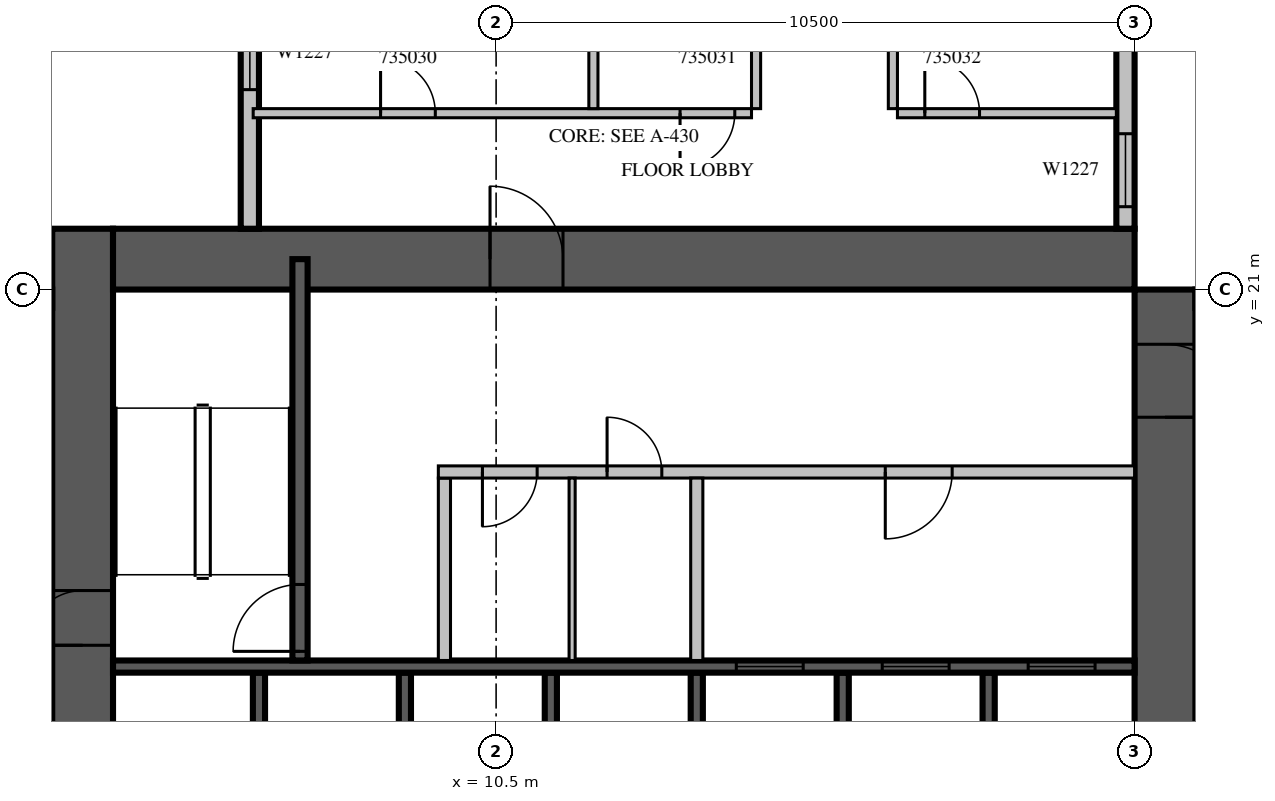
"""IFC4 building model, lengths in metres.
Left out: names, types, materials, properties, quantities, classifications, styles, units other than length and angle.
Written with IfcOpenShell. Run it as: python <this file> out.ifc"""

import sys

from ifc_helpers import new_model, si_unit, direction, frame, frame_2d, origin, place, context, subcontext, project, spatial, rectangle, extrude, source, transform, mapped, element, fill, save


model = new_model("IFC4")
c1 = context("Model", 3, precision=1e-05, world=origin(), true_north=direction((0.0, 1.0)))
c2 = subcontext(c1, "Body", "Model", "MODEL_VIEW")
j1 = project(units=[si_unit("LENGTHUNIT", "METRE"), si_unit("PLANEANGLEUNIT", "RADIAN")], contexts=[c1])
p1 = place(None, origin())
s1 = spatial("IfcSite", under=j1, at=p1, CompositionType="ELEMENT")
p2 = place(p1, origin())
s2 = spatial("IfcBuilding", under=s1, at=p2, CompositionType="ELEMENT")
p3 = place(p2, frame((0.0, 0.0, 158.1)))
s3 = spatial("IfcBuildingStorey", under=s2, at=p3, CompositionType="ELEMENT", Elevation=158.1)
m1 = source(origin(), c2, "Body", "SweptSolid", [
    extrude(rectangle(XDim=17.8, YDim=1.0, at=frame_2d((8.9, 0.0))), origin(), (0.0, 0.0, 1.0), 4.2),
])
p4 = place(p3, frame((3.7, 4.2, 0.0), z_axis=(0.0, 0.0, 1.0), x_axis=(0.0, 1.0, 0.0)))
e1 = element("IfcWall", 1, at=p4, inside=s3, PredefinedType="SHEAR", context=c2, shape_type="MappedRepresentation", body=[
    mapped(m1, transform((0.0, 0.0, 0.0), scale=1.0)),
])
m2 = source(origin(), c2, "Body", "SweptSolid", [
    extrude(rectangle(XDim=2.2, YDim=2.1, at=frame_2d((1.1, 1.05))), frame((0.0, 0.51, 0.0), z_axis=(0.0, -1.0, 0.0), x_axis=(1.0, 0.0, 0.0)), (0.0, 0.0, 1.0), 1.02),
])
p5 = place(p4, frame((4.2, 0.0, 0.0)))
e2 = element("IfcOpeningElement", 2, at=p5, cuts=e1, PredefinedType="OPENING", context=c2, shape_type="MappedRepresentation", body=[
    mapped(m2, transform((0.0, 0.0, 0.0), scale=1.0)),
])
m3 = source(origin(), c2, "Body", "SweptSolid", [
    extrude(rectangle(XDim=0.9, YDim=2.1, at=frame_2d((0.45, 1.05))), frame((0.0, 0.51, 0.0), z_axis=(0.0, -1.0, 0.0), x_axis=(1.0, 0.0, 0.0)), (0.0, 0.0, 1.0), 1.02),
])
p6 = place(p4, frame((10.95, 0.0, 0.0)))
e3 = element("IfcOpeningElement", 3, at=p6, cuts=e1, PredefinedType="OPENING", context=c2, shape_type="MappedRepresentation", body=[
    mapped(m3, transform((0.0, 0.0, 0.0), scale=1.0)),
])
m4 = source(origin(), c2, "Body", "SweptSolid", [
    extrude(rectangle(XDim=16.8, YDim=1.0, at=frame_2d((8.4, 0.0))), origin(), (0.0, 0.0, 1.0), 4.2),
])
p7 = place(p3, frame((21.5, 4.2, 0.0), z_axis=(0.0, 0.0, 1.0), x_axis=(0.0, 1.0, 0.0)))
e4 = element("IfcWall", 4, at=p7, inside=s3, PredefinedType="SHEAR", context=c2, shape_type="MappedRepresentation", body=[
    mapped(m4, transform((0.0, 0.0, 0.0), scale=1.0)),
])
p8 = place(p7, frame((4.2, 0.0, 0.0)))
e5 = element("IfcOpeningElement", 5, at=p8, cuts=e4, PredefinedType="OPENING", context=c2, shape_type="MappedRepresentation", body=[
    mapped(m2, transform((0.0, 0.0, 0.0), scale=1.0)),
])
m5 = source(origin(), c2, "Body", "SweptSolid", [
    extrude(rectangle(XDim=1.2, YDim=2.1, at=frame_2d((0.6, 1.05))), frame((0.0, 0.51, 0.0), z_axis=(0.0, -1.0, 0.0), x_axis=(1.0, 0.0, 0.0)), (0.0, 0.0, 1.0), 1.02),
])
p9 = place(p7, frame((14.7, 0.0, 0.0)))
e6 = element("IfcOpeningElement", 6, at=p9, cuts=e4, PredefinedType="OPENING", context=c2, shape_type="MappedRepresentation", body=[
    mapped(m5, transform((0.0, 0.0, 0.0), scale=1.0)),
])
p10 = place(p3, frame((4.2, 21.5, 0.0), z_axis=(0.0, 0.0, 1.0), x_axis=(1.0, 0.0, 0.0)))
e7 = element("IfcWall", 7, at=p10, inside=s3, PredefinedType="SHEAR", context=c2, shape_type="MappedRepresentation", body=[
    mapped(m4, transform((0.0, 0.0, 0.0), scale=1.0)),
])
p11 = place(p10, frame((6.2, 0.0, 0.0)))
e8 = element("IfcOpeningElement", 8, at=p11, cuts=e7, PredefinedType="OPENING", context=c2, shape_type="MappedRepresentation", body=[
    mapped(m5, transform((0.0, 0.0, 0.0), scale=1.0)),
])
m6 = source(origin(), c2, "Body", "SweptSolid", [
    extrude(rectangle(XDim=6.875, YDim=0.3, at=frame_2d((3.438, 0.0))), origin(), (0.0, 0.0, 1.0), 3.8),
])
p12 = place(p3, frame((20.85, 22.0, 0.0), z_axis=(0.0, 0.0, 1.0), x_axis=(0.0, 1.0, 0.0)))
e9 = element("IfcWall", 9, at=p12, inside=s3, PredefinedType="STANDARD", context=c2, shape_type="MappedRepresentation", body=[
    mapped(m6, transform((0.0, 0.0, 0.0), scale=1.0)),
])
m7 = source(origin(), c2, "Body", "SweptSolid", [
    extrude(rectangle(XDim=1.2, YDim=2.7, at=frame_2d((0.6, 1.35))), frame((0.0, 0.16, 0.0), z_axis=(0.0, -1.0, 0.0), x_axis=(1.0, 0.0, 0.0)), (0.0, 0.0, 1.0), 0.32),
])
p13 = place(p12, frame((0.362, 0.0, 0.6)))
e10 = element("IfcOpeningElement", 10, at=p13, cuts=e9, PredefinedType="OPENING", context=c2, shape_type="MappedRepresentation", body=[
    mapped(m7, transform((0.0, 0.0, 0.0), scale=1.0)),
])
m8 = source(origin(), c2, "Body", "SweptSolid", [
    extrude(rectangle(XDim=2.4, YDim=2.7, at=frame_2d((1.2, 1.35))), frame((0.0, 0.16, 0.0), z_axis=(0.0, -1.0, 0.0), x_axis=(1.0, 0.0, 0.0)), (0.0, 0.0, 1.0), 0.32),
])
p14 = place(p12, frame((4.1, 0.0, 0.6)))
e11 = element("IfcOpeningElement", 11, at=p14, cuts=e9, PredefinedType="OPENING", context=c2, shape_type="MappedRepresentation", body=[
    mapped(m8, transform((0.0, 0.0, 0.0), scale=1.0)),
])
m9 = source(origin(), c2, "Body", "SweptSolid", [
    extrude(rectangle(XDim=16.4, YDim=0.3, at=frame_2d((8.2, 0.0))), origin(), (0.0, 0.0, 1.0), 3.8),
])
p15 = place(p3, frame((6.45, 38.4, 0.0), z_axis=(0.0, 0.0, 1.0), x_axis=(0.0, -1.0, 0.0)))
e12 = element("IfcWall", 12, at=p15, inside=s3, PredefinedType="STANDARD", context=c2, shape_type="MappedRepresentation", body=[
    mapped(m9, transform((0.0, 0.0, 0.0), scale=1.0)),
])
m10 = source(origin(), c2, "Body", "SweptSolid", [
    extrude(rectangle(XDim=1.8, YDim=2.7, at=frame_2d((0.9, 1.35))), frame((0.0, 0.16, 0.0), z_axis=(0.0, -1.0, 0.0), x_axis=(1.0, 0.0, 0.0)), (0.0, 0.0, 1.0), 0.32),
])
p16 = place(p15, frame((1.15, 0.0, 0.6)))
e13 = element("IfcOpeningElement", 13, at=p16, cuts=e12, PredefinedType="OPENING", context=c2, shape_type="MappedRepresentation", body=[
    mapped(m10, transform((0.0, 0.0, 0.0), scale=1.0)),
])
p17 = place(p15, frame((5.162, 0.0, 0.6)))
e14 = element("IfcOpeningElement", 14, at=p17, cuts=e12, PredefinedType="OPENING", context=c2, shape_type="MappedRepresentation", body=[
    mapped(m10, transform((0.0, 0.0, 0.0), scale=1.0)),
])
p18 = place(p15, frame((9.438, 0.0, 0.6)))
e15 = element("IfcOpeningElement", 15, at=p18, cuts=e12, PredefinedType="OPENING", context=c2, shape_type="MappedRepresentation", body=[
    mapped(m10, transform((0.0, 0.0, 0.0), scale=1.0)),
])
p19 = place(p15, frame((12.912, 0.0, 0.6)))
e16 = element("IfcOpeningElement", 16, at=p19, cuts=e12, PredefinedType="OPENING", context=c2, shape_type="MappedRepresentation", body=[
    mapped(m7, transform((0.0, 0.0, 0.0), scale=1.0)),
])
m11 = source(origin(), c2, "Body", "SweptSolid", [
    extrude(rectangle(XDim=3.0, YDim=0.2, at=frame_2d((1.5, 0.0))), origin(), (0.0, 0.0, 1.0), 4.2),
])
for number, where, z_axis, x_axis in (
    (17, (6.6, 11.7, 0.0), (0.0, 0.0, 1.0), (0.0, 1.0, 0.0)),
    (18, (9.0, 11.7, 0.0), (0.0, 0.0, 1.0), (0.0, 1.0, 0.0)),
    (19, (11.4, 11.7, 0.0), (0.0, 0.0, 1.0), (0.0, 1.0, 0.0)),
    (20, (13.8, 11.7, 0.0), (0.0, 0.0, 1.0), (0.0, 1.0, 0.0)),
    (21, (16.2, 11.7, 0.0), (0.0, 0.0, 1.0), (0.0, 1.0, 0.0)),
    (22, (18.6, 11.7, 0.0), (0.0, 0.0, 1.0), (0.0, 1.0, 0.0)),
):
    element("IfcWall", number, at=place(p3, frame(where, z_axis=z_axis, x_axis=x_axis)), inside=s3, PredefinedType="SOLIDWALL", context=c2, shape_type="MappedRepresentation", body=[
        mapped(m11, transform((0.0, 0.0, 0.0), scale=1.0)),
    ])
m12 = source(origin(), c2, "Body", "SweptSolid", [
    extrude(rectangle(XDim=16.8, YDim=0.2, at=frame_2d((8.4, 0.0))), origin(), (0.0, 0.0, 1.0), 4.2),
])
p20 = place(p3, frame((4.2, 14.8, 0.0), z_axis=(0.0, 0.0, 1.0), x_axis=(1.0, 0.0, 0.0)))
e23 = element("IfcWall", 23, at=p20, inside=s3, PredefinedType="SOLIDWALL", context=c2, shape_type="MappedRepresentation", body=[
    mapped(m12, transform((0.0, 0.0, 0.0), scale=1.0)),
])
m13 = source(origin(), c2, "Body", "SweptSolid", [
    extrude(rectangle(XDim=1.1, YDim=2.1, at=frame_2d((0.55, 1.05))), frame((0.0, 0.11, 0.0), z_axis=(0.0, -1.0, 0.0), x_axis=(1.0, 0.0, 0.0)), (0.0, 0.0, 1.0), 0.22),
])
p21 = place(p20, frame((10.25, 0.0, 0.0)))
e24 = element("IfcOpeningElement", 24, at=p21, cuts=e23, PredefinedType="OPENING", context=c2, shape_type="MappedRepresentation", body=[
    mapped(m13, transform((0.0, 0.0, 0.0), scale=1.0)),
])
p22 = place(p20, frame((12.65, 0.0, 0.0)))
e25 = element("IfcOpeningElement", 25, at=p22, cuts=e23, PredefinedType="OPENING", context=c2, shape_type="MappedRepresentation", body=[
    mapped(m13, transform((0.0, 0.0, 0.0), scale=1.0)),
])
p23 = place(p20, frame((15.05, 0.0, 0.0)))
e26 = element("IfcOpeningElement", 26, at=p23, cuts=e23, PredefinedType="OPENING", context=c2, shape_type="MappedRepresentation", body=[
    mapped(m13, transform((0.0, 0.0, 0.0), scale=1.0)),
])
m14 = source(origin(), c2, "Body", "SweptSolid", [
    extrude(rectangle(XDim=6.6, YDim=0.25, at=frame_2d((3.3, 0.0))), origin(), (0.0, 0.0, 1.0), 3.8),
])
p24 = place(p3, frame((7.275, 14.9, 0.0), z_axis=(0.0, 0.0, 1.0), x_axis=(0.0, 1.0, 0.0)))
e27 = element("IfcWall", 27, at=p24, inside=s3, PredefinedType="SOLIDWALL", context=c2, shape_type="MappedRepresentation", body=[
    mapped(m14, transform((0.0, 0.0, 0.0), scale=1.0)),
])
m15 = source(origin(), c2, "Body", "SweptSolid", [
    extrude(rectangle(XDim=1.1, YDim=2.1, at=frame_2d((0.55, 1.05))), frame((0.0, 0.135, 0.0), z_axis=(0.0, -1.0, 0.0), x_axis=(1.0, 0.0, 0.0)), (0.0, 0.0, 1.0), 0.27),
])
p25 = place(p24, frame((0.15, 0.0, 0.0)))
e28 = element("IfcOpeningElement", 28, at=p25, cuts=e27, PredefinedType="OPENING", context=c2, shape_type="MappedRepresentation", body=[
    mapped(m15, transform((0.0, 0.0, 0.0), scale=1.0)),
])
m16 = source(origin(), c2, "Body", "SweptSolid", [
    extrude(rectangle(XDim=3.0, YDim=0.2, at=frame_2d((1.5, 0.0))), origin(), (0.0, 0.0, 1.0), 3.8),
])
p26 = place(p3, frame((9.65, 14.9, 0.0), z_axis=(0.0, 0.0, 1.0), x_axis=(0.0, 1.0, 0.0)))
e29 = element("IfcWall", 29, at=p26, inside=s3, PredefinedType="PARTITIONING", context=c2, shape_type="MappedRepresentation", body=[
    mapped(m16, transform((0.0, 0.0, 0.0), scale=1.0)),
])
m17 = source(origin(), c2, "Body", "SweptSolid", [
    extrude(rectangle(XDim=11.45, YDim=0.2, at=frame_2d((5.725, 0.0))), origin(), (0.0, 0.0, 1.0), 3.8),
])
p27 = place(p3, frame((9.55, 18.0, 0.0), z_axis=(0.0, 0.0, 1.0), x_axis=(1.0, 0.0, 0.0)))
e30 = element("IfcWall", 30, at=p27, inside=s3, PredefinedType="PARTITIONING", context=c2, shape_type="MappedRepresentation", body=[
    mapped(m17, transform((0.0, 0.0, 0.0), scale=1.0)),
])
m18 = source(origin(), c2, "Body", "SweptSolid", [
    extrude(rectangle(XDim=0.9, YDim=2.1, at=frame_2d((0.45, 1.05))), frame((0.0, 0.11, 0.0), z_axis=(0.0, -1.0, 0.0), x_axis=(1.0, 0.0, 0.0)), (0.0, 0.0, 1.0), 0.22),
])
p28 = place(p27, frame((0.725, 0.0, 0.0)))
e31 = element("IfcOpeningElement", 31, at=p28, cuts=e30, PredefinedType="OPENING", context=c2, shape_type="MappedRepresentation", body=[
    mapped(m18, transform((0.0, 0.0, 0.0), scale=1.0)),
])
p29 = place(p27, frame((2.775, 0.0, 0.0)))
e32 = element("IfcOpeningElement", 32, at=p29, cuts=e30, PredefinedType="OPENING", context=c2, shape_type="MappedRepresentation", body=[
    mapped(m18, transform((0.0, 0.0, 0.0), scale=1.0)),
])
p30 = place(p27, frame((7.35, 0.0, 0.0)))
e33 = element("IfcOpeningElement", 33, at=p30, cuts=e30, PredefinedType="OPENING", context=c2, shape_type="MappedRepresentation", body=[
    mapped(m13, transform((0.0, 0.0, 0.0), scale=1.0)),
])
p31 = place(p3, frame((13.8, 14.9, 0.0), z_axis=(0.0, 0.0, 1.0), x_axis=(0.0, 1.0, 0.0)))
e34 = element("IfcWall", 34, at=p31, inside=s3, PredefinedType="PARTITIONING", context=c2, shape_type="MappedRepresentation", body=[
    mapped(m16, transform((0.0, 0.0, 0.0), scale=1.0)),
])
m19 = source(origin(), c2, "Body", "SweptSolid", [
    extrude(rectangle(XDim=3.0, YDim=0.1, at=frame_2d((1.5, 0.0))), origin(), (0.0, 0.0, 1.0), 3.8),
])
p32 = place(p3, frame((11.75, 14.9, 0.0), z_axis=(0.0, 0.0, 1.0), x_axis=(0.0, 1.0, 0.0)))
e35 = element("IfcWall", 35, at=p32, inside=s3, PredefinedType="PARTITIONING", context=c2, shape_type="MappedRepresentation", body=[
    mapped(m19, transform((0.0, 0.0, 0.0), scale=1.0)),
])
m20 = source(origin(), c2, "Body", "SweptSolid", [
    extrude(rectangle(XDim=8.195, YDim=0.15, at=frame_2d((4.098, 0.0))), origin(), (0.0, 0.0, 1.0), 3.8),
])
p33 = place(p3, frame((6.505, 23.9, 0.0), z_axis=(0.0, 0.0, 1.0), x_axis=(1.0, 0.0, 0.0)))
e36 = element("IfcWall", 36, at=p33, inside=s3, PredefinedType="PARTITIONING", context=c2, shape_type="MappedRepresentation", body=[
    mapped(m20, transform((0.0, 0.0, 0.0), scale=1.0)),
])
m21 = source(origin(), c2, "Body", "SweptSolid", [
    extrude(rectangle(XDim=0.9, YDim=2.1, at=frame_2d((0.45, 1.05))), frame((0.0, 0.085, 0.0), z_axis=(0.0, -1.0, 0.0), x_axis=(1.0, 0.0, 0.0)), (0.0, 0.0, 1.0), 0.17),
])
p34 = place(p33, frame((2.095, 0.0, 0.0)))
e37 = element("IfcOpeningElement", 37, at=p34, cuts=e36, PredefinedType="OPENING", context=c2, shape_type="MappedRepresentation", body=[
    mapped(m21, transform((0.0, 0.0, 0.0), scale=1.0)),
])
p35 = place(p33, frame((7.02, 0.0, 0.0)))
e38 = element("IfcOpeningElement", 38, at=p35, cuts=e36, PredefinedType="OPENING", context=c2, shape_type="MappedRepresentation", body=[
    mapped(m21, transform((0.0, 0.0, 0.0), scale=1.0)),
])
m22 = source(origin(), c2, "Body", "SweptSolid", [
    extrude(rectangle(XDim=3.6, YDim=0.15, at=frame_2d((1.8, 0.0))), origin(), (0.0, 0.0, 1.0), 3.8),
])
p36 = place(p3, frame((17.1, 23.9, 0.0), z_axis=(0.0, 0.0, 1.0), x_axis=(1.0, 0.0, 0.0)))
e39 = element("IfcWall", 39, at=p36, inside=s3, PredefinedType="PARTITIONING", context=c2, shape_type="MappedRepresentation", body=[
    mapped(m22, transform((0.0, 0.0, 0.0), scale=1.0)),
])
p37 = place(p36, frame((0.45, 0.0, 0.0)))
e40 = element("IfcOpeningElement", 40, at=p37, cuts=e39, PredefinedType="OPENING", context=c2, shape_type="MappedRepresentation", body=[
    mapped(m21, transform((0.0, 0.0, 0.0), scale=1.0)),
])
m23 = source(origin(), c2, "Body", "SweptSolid", [
    extrude(rectangle(XDim=5.35, YDim=0.15, at=frame_2d((2.675, 0.0))), origin(), (0.0, 0.0, 1.0), 3.8),
])
for number, where, z_axis, x_axis in (
    (41, (12.1, 23.975, 0.0), (0.0, 0.0, 1.0), (0.0, 1.0, 0.0)),
    (42, (14.775, 23.975, 0.0), (0.0, 0.0, 1.0), (0.0, 1.0, 0.0)),
    (43, (17.025, 29.325, 0.0), (0.0, 0.0, 1.0), (0.0, -1.0, 0.0)),
):
    element("IfcWall", number, at=place(p3, frame(where, z_axis=z_axis, x_axis=x_axis)), inside=s3, PredefinedType="PARTITIONING", context=c2, shape_type="MappedRepresentation", body=[
        mapped(m23, transform((0.0, 0.0, 0.0), scale=1.0)),
    ])
m24 = source(origin(), c2, "Body", "SweptSolid", [
    extrude(rectangle(XDim=1.2, YDim=2.7, at=frame_2d((0.6, 1.35))), frame((0.0, 0.03, 0.0), z_axis=(0.0, -1.0, 0.0), x_axis=(1.0, 0.0, 0.0)), (0.0, 0.0, 1.0), 0.06),
])
p38 = place(p13, origin())
e44 = element("IfcWindow", 44, at=p38, inside=s3, PartitioningType="SINGLE_PANEL", PredefinedType="WINDOW", context=c2, shape_type="MappedRepresentation", body=[
    mapped(m24, transform((0.0, 0.0, 0.0), scale=1.0)),
])
fill(e10, e44)
p39 = place(p19, origin())
e45 = element("IfcWindow", 45, at=p39, inside=s3, PartitioningType="SINGLE_PANEL", PredefinedType="WINDOW", context=c2, shape_type="MappedRepresentation", body=[
    mapped(m24, transform((0.0, 0.0, 0.0), scale=1.0)),
])
fill(e16, e45)
m25 = source(origin(), c2, "Body", "SweptSolid", [
    extrude(rectangle(XDim=1.1, YDim=2.1, at=frame_2d((0.55, 1.05))), frame((0.0, 0.025, 0.0), z_axis=(0.0, -1.0, 0.0), x_axis=(1.0, 0.0, 0.0)), (0.0, 0.0, 1.0), 0.05),
])
p40 = place(p21, origin())
e46 = element("IfcDoor", 46, at=p40, inside=s3, OperationType="SLIDING_TO_LEFT", PredefinedType="DOOR", context=c2, shape_type="MappedRepresentation", body=[
    mapped(m25, transform((0.0, 0.0, 0.0), scale=1.0)),
])
fill(e24, e46)
p41 = place(p22, origin())
e47 = element("IfcDoor", 47, at=p41, inside=s3, OperationType="SLIDING_TO_LEFT", PredefinedType="DOOR", context=c2, shape_type="MappedRepresentation", body=[
    mapped(m25, transform((0.0, 0.0, 0.0), scale=1.0)),
])
fill(e25, e47)
p42 = place(p23, origin())
e48 = element("IfcDoor", 48, at=p42, inside=s3, OperationType="SLIDING_TO_LEFT", PredefinedType="DOOR", context=c2, shape_type="MappedRepresentation", body=[
    mapped(m25, transform((0.0, 0.0, 0.0), scale=1.0)),
])
fill(e26, e48)
p43 = place(p25, origin())
e49 = element("IfcDoor", 49, at=p43, inside=s3, OperationType="SINGLE_SWING_LEFT", PredefinedType="DOOR", context=c2, shape_type="MappedRepresentation", body=[
    mapped(m25, transform((0.0, 0.0, 0.0), scale=1.0)),
])
fill(e28, e49)
m26 = source(origin(), c2, "Body", "SweptSolid", [
    extrude(rectangle(XDim=0.9, YDim=2.1, at=frame_2d((0.45, 1.05))), frame((0.0, 0.025, 0.0), z_axis=(0.0, -1.0, 0.0), x_axis=(1.0, 0.0, 0.0)), (0.0, 0.0, 1.0), 0.05),
])
p44 = place(p28, origin())
e50 = element("IfcDoor", 50, at=p44, inside=s3, OperationType="SINGLE_SWING_RIGHT", PredefinedType="DOOR", context=c2, shape_type="MappedRepresentation", body=[
    mapped(m26, transform((0.0, 0.0, 0.0), scale=1.0)),
])
fill(e31, e50)
p45 = place(p29, origin())
e51 = element("IfcDoor", 51, at=p45, inside=s3, OperationType="SINGLE_SWING_LEFT", PredefinedType="DOOR", context=c2, shape_type="MappedRepresentation", body=[
    mapped(m26, transform((0.0, 0.0, 0.0), scale=1.0)),
])
fill(e32, e51)
p46 = place(p30, origin())
e52 = element("IfcDoor", 52, at=p46, inside=s3, OperationType="SINGLE_SWING_RIGHT", PredefinedType="DOOR", context=c2, shape_type="MappedRepresentation", body=[
    mapped(m25, transform((0.0, 0.0, 0.0), scale=1.0)),
])
fill(e33, e52)
m27 = source(origin(), c2, "Body", "SweptSolid", [
    extrude(rectangle(XDim=1.2, YDim=2.1, at=frame_2d((0.6, 1.05))), frame((0.0, 0.025, 0.0), z_axis=(0.0, -1.0, 0.0), x_axis=(1.0, 0.0, 0.0)), (0.0, 0.0, 1.0), 0.05),
])
p47 = place(p11, origin())
e53 = element("IfcDoor", 53, at=p47, inside=s3, OperationType="SINGLE_SWING_LEFT", PredefinedType="DOOR", context=c2, shape_type="MappedRepresentation", body=[
    mapped(m27, transform((0.0, 0.0, 0.0), scale=1.0)),
])
fill(e8, e53)
p48 = place(p9, origin())
e54 = element("IfcDoor", 54, at=p48, inside=s3, OperationType="SINGLE_SWING_RIGHT", PredefinedType="DOOR", context=c2, shape_type="MappedRepresentation", body=[
    mapped(m27, transform((0.0, 0.0, 0.0), scale=1.0)),
])
fill(e6, e54)
p49 = place(p6, origin())
e55 = element("IfcDoor", 55, at=p49, inside=s3, OperationType="SINGLE_SWING_LEFT", PredefinedType="DOOR", context=c2, shape_type="MappedRepresentation", body=[
    mapped(m26, transform((0.0, 0.0, 0.0), scale=1.0)),
])
fill(e3, e55)
p50 = place(p34, origin())
e56 = element("IfcDoor", 56, at=p50, inside=s3, OperationType="SINGLE_SWING_LEFT", PredefinedType="DOOR", context=c2, shape_type="MappedRepresentation", body=[
    mapped(m26, transform((0.0, 0.0, 0.0), scale=1.0)),
])
fill(e37, e56)
p51 = place(p35, origin())
e57 = element("IfcDoor", 57, at=p51, inside=s3, OperationType="SINGLE_SWING_RIGHT", PredefinedType="DOOR", context=c2, shape_type="MappedRepresentation", body=[
    mapped(m26, transform((0.0, 0.0, 0.0), scale=1.0)),
])
fill(e38, e57)
p52 = place(p37, origin())
e58 = element("IfcDoor", 58, at=p52, inside=s3, OperationType="SINGLE_SWING_LEFT", PredefinedType="DOOR", context=c2, shape_type="MappedRepresentation", body=[
    mapped(m26, transform((0.0, 0.0, 0.0), scale=1.0)),
])
fill(e40, e58)
save(model, sys.argv[1])
